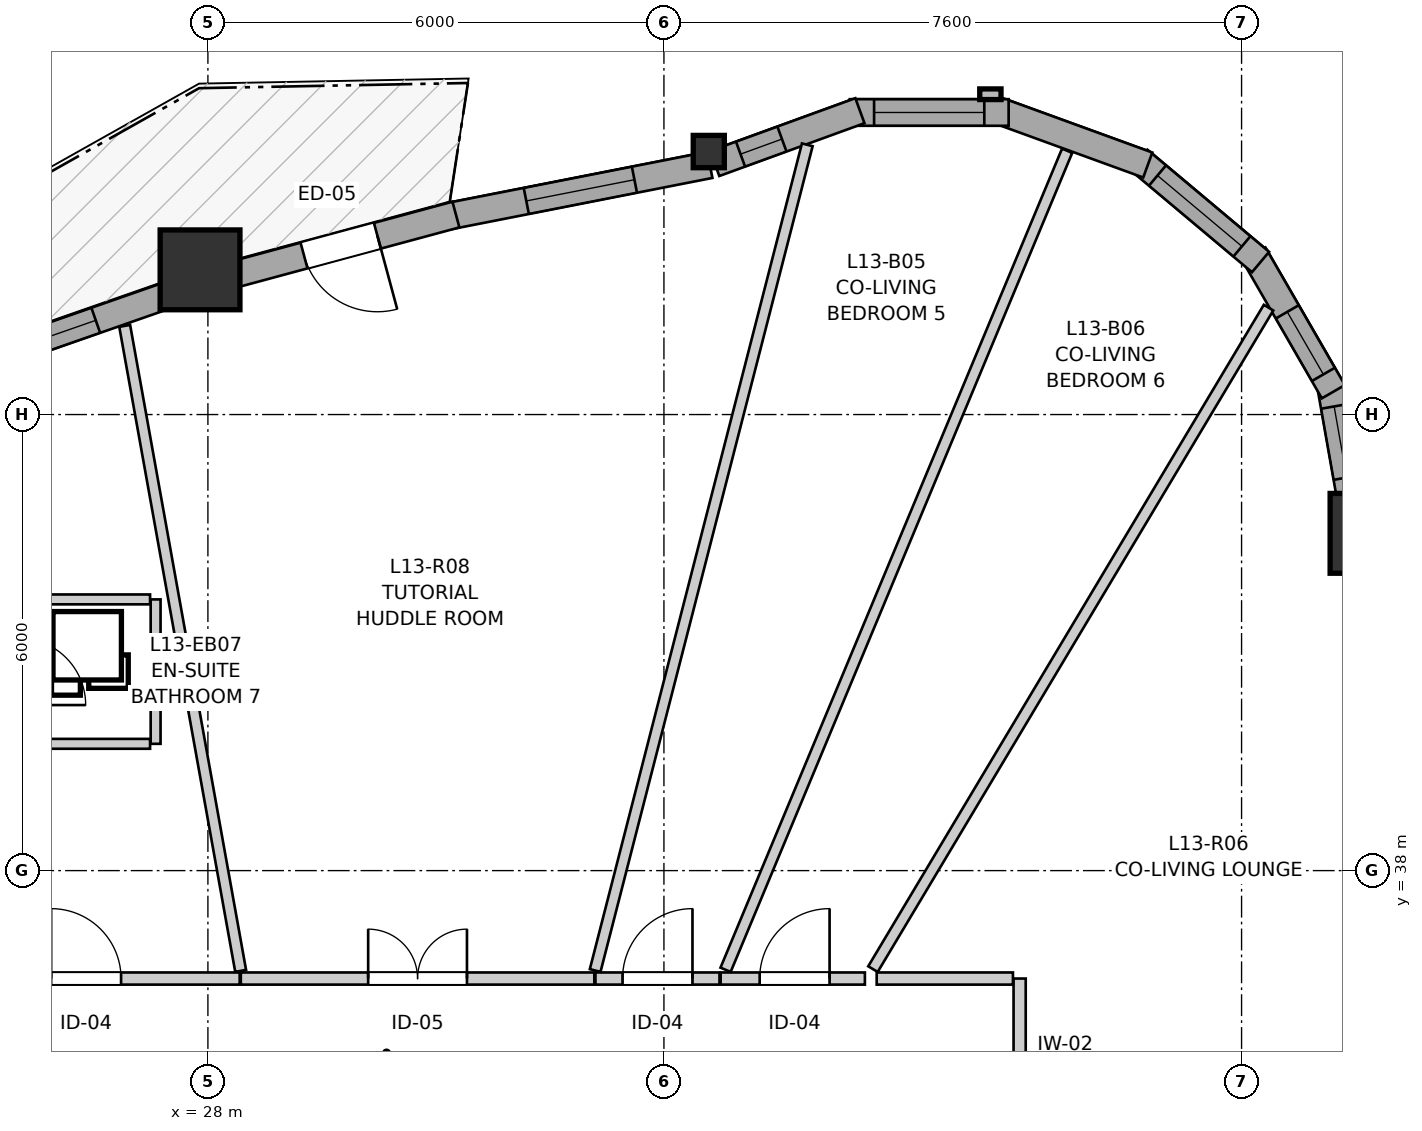
"""IFC4 building model, lengths in metres.
Left out: names, types, materials, properties, quantities, classifications, styles, units other than length and angle.
Written with IfcOpenShell. Run it as: python <this file> out.ifc"""

import sys

from ifc_helpers import new_model, si_unit, direction, frame, frame_2d, origin, origin_2d, place, context, subcontext, project, spatial, rectangle, i_section, extrude, source, transform, mapped, element, fill, save


model = new_model("IFC4")
c1 = context("Model", 3, precision=1e-05, world=origin(), true_north=direction((0.0, 1.0)))
c2 = subcontext(c1, "Body", "Model", "MODEL_VIEW")
j1 = project(units=[si_unit("LENGTHUNIT", "METRE"), si_unit("PLANEANGLEUNIT", "RADIAN")], contexts=[c1])
p1 = place(None, origin())
s1 = spatial("IfcSite", under=j1, at=p1, CompositionType="ELEMENT")
p2 = place(p1, origin())
s2 = spatial("IfcBuilding", under=s1, at=p2, CompositionType="ELEMENT")
p3 = place(p2, frame((0.0, 0.0, 46.2)))
s3 = spatial("IfcBuildingStorey", under=s2, at=p3, CompositionType="ELEMENT", Elevation=46.2)
m1 = source(origin(), c2, "Body", "SweptSolid", [
    extrude(rectangle(XDim=1.05, YDim=1.05, at=origin_2d()), origin(), (0.0, 0.0, 1.0), 2.94),
])
p4 = place(p3, frame((43.29, 42.437, 0.0), z_axis=(0.0, 0.0, 1.0), x_axis=(1.0, 0.0, 0.0)))
e1 = element("IfcColumn", 1, at=p4, inside=s3, PredefinedType="COLUMN", context=c2, shape_type="MappedRepresentation", body=[
    mapped(m1, transform((0.0, 0.0, 0.0), x_axis=(1.0, 0.0, 0.0), y_axis=(0.0, 1.0, 0.0), z_axis=(0.0, 0.0, 1.0), scale=1.0)),
])
m2 = source(origin(), c2, "Body", "SweptSolid", [
    extrude(i_section(OverallWidth=0.409, OverallDepth=0.425, WebThickness=0.03, FlangeThickness=0.048, FilletRadius=0.015, at=origin_2d()), origin(), (0.0, 0.0, 1.0), 2.94),
])
p5 = place(p3, frame((34.59, 47.46, 0.0), z_axis=(0.0, 0.0, 1.0), x_axis=(1.0, 0.0, 0.0)))
e2 = element("IfcColumn", 2, at=p5, inside=s3, PredefinedType="PILASTER", context=c2, shape_type="MappedRepresentation", body=[
    mapped(m2, transform((0.0, 0.0, 0.0), x_axis=(1.0, 0.0, 0.0), y_axis=(0.0, 1.0, 0.0), z_axis=(0.0, 0.0, 1.0), scale=1.0)),
])
p6 = place(p3, frame((27.896, 45.904, 0.0), z_axis=(0.0, 0.0, 1.0), x_axis=(1.0, 0.0, 0.0)))
e3 = element("IfcColumn", 3, at=p6, inside=s3, PredefinedType="COLUMN", context=c2, shape_type="MappedRepresentation", body=[
    mapped(m1, transform((0.0, 0.0, 0.0), x_axis=(1.0, 0.0, 0.0), y_axis=(0.0, 1.0, 0.0), z_axis=(0.0, 0.0, 1.0), scale=1.0)),
])
p7 = place(p3, frame((43.066, 42.702, 0.0), z_axis=(0.0, 0.0, 1.0), x_axis=(-0.173745591742, 0.984790571315, 0.0)))
e4 = element("IfcWall", 4, at=p7, inside=s3, PredefinedType="SOLIDWALL", context=c2, shape_type="SweptSolid", body=[
    extrude(rectangle(XDim=1.752, YDim=0.35, at=frame_2d((0.876, 0.0))), origin(), (0.0, 0.0, 1.0), 2.42),
])
p8 = place(p7, frame((0.476, 0.0, 0.82)))
e5 = element("IfcOpeningElement", 5, at=p8, cuts=e4, PredefinedType="OPENING", context=c2, shape_type="SweptSolid", body=[
    extrude(rectangle(XDim=0.95, YDim=1.35, at=frame_2d((0.475, 0.675))), frame((0.0, 0.185, 0.0), z_axis=(0.0, -1.0, 0.0), x_axis=(1.0, 0.0, 0.0)), (0.0, 0.0, 1.0), 0.37),
])
p9 = place(p3, frame((42.808, 44.301, 0.0), z_axis=(0.0, 0.0, 1.0), x_axis=(-0.500046000743, 0.865998843614, 0.0)))
e6 = element("IfcWall", 6, at=p9, inside=s3, PredefinedType="SOLIDWALL", context=c2, shape_type="SweptSolid", body=[
    extrude(rectangle(XDim=2.09, YDim=0.35, at=frame_2d((1.045, 0.0))), origin(), (0.0, 0.0, 1.0), 2.42),
])
p10 = place(p9, frame((0.263, 0.0, 0.82)))
e7 = element("IfcOpeningElement", 7, at=p10, cuts=e6, PredefinedType="OPENING", context=c2, shape_type="SweptSolid", body=[
    extrude(rectangle(XDim=0.95, YDim=1.35, at=frame_2d((0.475, 0.675))), frame((0.0, 0.185, 0.0), z_axis=(0.0, -1.0, 0.0), x_axis=(1.0, 0.0, 0.0)), (0.0, 0.0, 1.0), 0.37),
])
p11 = place(p3, frame((41.85, 46.007, 0.0), z_axis=(0.0, 0.0, 1.0), x_axis=(-0.766024572719, 0.642811289563, 0.0)))
e8 = element("IfcWall", 8, at=p11, inside=s3, PredefinedType="SOLIDWALL", context=c2, shape_type="SweptSolid", body=[
    extrude(rectangle(XDim=2.09, YDim=0.35, at=frame_2d((1.045, 0.0))), origin(), (0.0, 0.0, 1.0), 2.42),
])
p12 = place(p11, frame((0.32, 0.0, 0.82)))
e9 = element("IfcOpeningElement", 9, at=p12, cuts=e8, PredefinedType="OPENING", context=c2, shape_type="SweptSolid", body=[
    extrude(rectangle(XDim=1.45, YDim=1.25, at=frame_2d((0.725, 0.625))), frame((0.0, 0.185, 0.0), z_axis=(0.0, -1.0, 0.0), x_axis=(1.0, 0.0, 0.0)), (0.0, 0.0, 1.0), 0.37),
])
p13 = place(p3, frame((40.366, 47.283, 0.0), z_axis=(0.0, 0.0, 1.0), x_axis=(-0.939711556618, 0.341968113072, 0.0)))
e10 = element("IfcWall", 10, at=p13, inside=s3, PredefinedType="SOLIDWALL", context=c2, shape_type="SweptSolid", body=[
    extrude(rectangle(XDim=2.09, YDim=0.35, at=frame_2d((1.045, 0.0))), origin(), (0.0, 0.0, 1.0), 2.42),
])
p14 = place(p3, frame((38.535, 47.974, 0.0), z_axis=(0.0, 0.0, 1.0), x_axis=(-1.0, 0.0, 0.0)))
e11 = element("IfcWall", 11, at=p14, inside=s3, PredefinedType="SOLIDWALL", context=c2, shape_type="SweptSolid", body=[
    extrude(rectangle(XDim=2.09, YDim=0.35, at=frame_2d((1.045, 0.0))), origin(), (0.0, 0.0, 1.0), 2.42),
])
p15 = place(p14, frame((0.32, 0.0, 0.82)))
e12 = element("IfcOpeningElement", 12, at=p15, cuts=e11, PredefinedType="OPENING", context=c2, shape_type="SweptSolid", body=[
    extrude(rectangle(XDim=1.45, YDim=1.25, at=frame_2d((0.725, 0.625))), frame((0.0, 0.185, 0.0), z_axis=(0.0, -1.0, 0.0), x_axis=(1.0, 0.0, 0.0)), (0.0, 0.0, 1.0), 0.37),
])
p16 = place(p3, frame((36.578, 47.998, 0.0), z_axis=(0.0, 0.0, 1.0), x_axis=(-0.939691662178, -0.342022777067, 0.0)))
e13 = element("IfcWall", 13, at=p16, inside=s3, PredefinedType="SOLIDWALL", context=c2, shape_type="SweptSolid", body=[
    extrude(rectangle(XDim=2.032, YDim=0.35, at=frame_2d((1.016, 0.0))), origin(), (0.0, 0.0, 1.0), 2.42),
])
p17 = place(p16, frame((1.091, 0.0, 0.82)))
e14 = element("IfcOpeningElement", 14, at=p17, cuts=e13, PredefinedType="OPENING", context=c2, shape_type="SweptSolid", body=[
    extrude(rectangle(XDim=0.58, YDim=1.35, at=frame_2d((0.29, 0.675))), frame((0.0, 0.185, 0.0), z_axis=(0.0, -1.0, 0.0), x_axis=(1.0, 0.0, 0.0)), (0.0, 0.0, 1.0), 0.37),
])
p18 = place(p3, frame((34.604, 47.284, 0.0), z_axis=(0.0, 0.0, 1.0), x_axis=(-0.981236541068, -0.192807807086, 0.0)))
e15 = element("IfcWall", 15, at=p18, inside=s3, PredefinedType="SOLIDWALL", context=c2, shape_type="SweptSolid", body=[
    extrude(rectangle(XDim=3.492, YDim=0.35, at=frame_2d((1.746, 0.0))), origin(), (0.0, 0.0, 1.0), 2.42),
])
p19 = place(p18, frame((1.011, 0.0, 0.82)))
e16 = element("IfcOpeningElement", 16, at=p19, cuts=e15, PredefinedType="OPENING", context=c2, shape_type="SweptSolid", body=[
    extrude(rectangle(XDim=1.45, YDim=1.25, at=frame_2d((0.725, 0.625))), frame((0.0, 0.185, 0.0), z_axis=(0.0, -1.0, 0.0), x_axis=(1.0, 0.0, 0.0)), (0.0, 0.0, 1.0), 0.37),
])
p20 = place(p3, frame((31.263, 46.631, 0.0), z_axis=(0.0, 0.0, 1.0), x_axis=(-0.965460187066, -0.260550623086, 0.0)))
e17 = element("IfcWall", 17, at=p20, inside=s3, PredefinedType="SOLIDWALL", context=c2, shape_type="SweptSolid", body=[
    extrude(rectangle(XDim=3.14, YDim=0.35, at=frame_2d((1.57, 0.0))), origin(), (0.0, 0.0, 1.0), 2.42),
])
p21 = place(p20, frame((1.07, 0.0, 0.0)))
e18 = element("IfcOpeningElement", 18, at=p21, cuts=e17, PredefinedType="OPENING", context=c2, shape_type="SweptSolid", body=[
    extrude(rectangle(XDim=1.0, YDim=2.1, at=frame_2d((0.5, 1.05))), frame((0.0, 0.185, 0.0), z_axis=(0.0, -1.0, 0.0), x_axis=(1.0, 0.0, 0.0)), (0.0, 0.0, 1.0), 0.37),
])
p22 = place(p3, frame((27.671, 45.64, 0.0), z_axis=(0.0, 0.0, 1.0), x_axis=(-0.944140624307, -0.329542837175, 0.0)))
e19 = element("IfcWall", 19, at=p22, inside=s3, PredefinedType="SOLIDWALL", context=c2, shape_type="SweptSolid", body=[
    extrude(rectangle(XDim=3.084, YDim=0.35, at=frame_2d((1.542, 0.0))), origin(), (0.0, 0.0, 1.0), 2.42),
])
p23 = place(p22, frame((1.214, 0.0, 0.82)))
e20 = element("IfcOpeningElement", 20, at=p23, cuts=e19, PredefinedType="OPENING", context=c2, shape_type="SweptSolid", body=[
    extrude(rectangle(XDim=1.45, YDim=1.25, at=frame_2d((0.725, 0.625))), frame((0.0, 0.185, 0.0), z_axis=(0.0, -1.0, 0.0), x_axis=(1.0, 0.0, 0.0)), (0.0, 0.0, 1.0), 0.37),
])
p24 = place(p3, frame((38.68, 36.58, 0.0), z_axis=(0.0, 0.0, 1.0), x_axis=(0.0, -1.0, 0.0)))
e21 = element("IfcWall", 21, at=p24, inside=s3, PredefinedType="PARTITIONING", context=c2, shape_type="SweptSolid", body=[
    extrude(rectangle(XDim=5.88, YDim=0.16, at=frame_2d((2.94, 0.0))), origin(), (0.0, 0.0, 1.0), 2.94),
])
p25 = place(p24, frame((2.281, 0.0, 0.0)))
e22 = element("IfcOpeningElement", 22, at=p25, cuts=e21, PredefinedType="OPENING", context=c2, shape_type="SweptSolid", body=[
    extrude(rectangle(XDim=1.3, YDim=2.1, at=frame_2d((0.65, 1.05))), frame((0.0, 0.09, 0.0), z_axis=(0.0, -1.0, 0.0), x_axis=(1.0, 0.0, 0.0)), (0.0, 0.0, 1.0), 0.18),
])
p26 = place(p3, frame((28.433, 36.58, 0.0), z_axis=(0.0, 0.0, 1.0), x_axis=(1.0, 0.0, 0.0)))
e23 = element("IfcWall", 23, at=p26, inside=s3, PredefinedType="PARTITIONING", context=c2, shape_type="SweptSolid", body=[
    extrude(rectangle(XDim=4.651, YDim=0.16, at=frame_2d((2.325, 0.0))), origin(), (0.0, 0.0, 1.0), 2.94),
])
p27 = place(p26, frame((1.676, 0.0, 0.0)))
e24 = element("IfcOpeningElement", 24, at=p27, cuts=e23, PredefinedType="OPENING", context=c2, shape_type="SweptSolid", body=[
    extrude(rectangle(XDim=1.3, YDim=2.1, at=frame_2d((0.65, 1.05))), frame((0.0, 0.09, 0.0), z_axis=(0.0, -1.0, 0.0), x_axis=(1.0, 0.0, 0.0)), (0.0, 0.0, 1.0), 0.18),
])
p28 = place(p3, frame((24.329, 36.58, 0.0), z_axis=(0.0, 0.0, 1.0), x_axis=(1.0, 0.0, 0.0)))
e25 = element("IfcWall", 25, at=p28, inside=s3, PredefinedType="PARTITIONING", context=c2, shape_type="SweptSolid", body=[
    extrude(rectangle(XDim=4.089, YDim=0.16, at=frame_2d((2.044, 0.0))), origin(), (0.0, 0.0, 1.0), 2.548),
])
p29 = place(p28, frame((1.608, 0.0, 0.0)))
e26 = element("IfcOpeningElement", 26, at=p29, cuts=e25, PredefinedType="OPENING", context=c2, shape_type="SweptSolid", body=[
    extrude(rectangle(XDim=0.92, YDim=2.1, at=frame_2d((0.46, 1.05))), frame((0.0, 0.09, 0.0), z_axis=(0.0, -1.0, 0.0), x_axis=(1.0, 0.0, 0.0)), (0.0, 0.0, 1.0), 0.18),
])
p30 = place(p3, frame((34.746, 36.58, 0.0), z_axis=(0.0, 0.0, 1.0), x_axis=(1.0, 0.0, 0.0)))
e27 = element("IfcWall", 27, at=p30, inside=s3, PredefinedType="PARTITIONING", context=c2, shape_type="SweptSolid", body=[
    extrude(rectangle(XDim=1.898, YDim=0.16, at=frame_2d((0.949, 0.0))), origin(), (0.0, 0.0, 1.0), 2.94),
])
p31 = place(p30, frame((0.513, 0.0, 0.0)))
e28 = element("IfcOpeningElement", 28, at=p31, cuts=e27, PredefinedType="OPENING", context=c2, shape_type="SweptSolid", body=[
    extrude(rectangle(XDim=0.92, YDim=2.1, at=frame_2d((0.46, 1.05))), frame((0.0, 0.09, 0.0), z_axis=(0.0, -1.0, 0.0), x_axis=(1.0, 0.0, 0.0)), (0.0, 0.0, 1.0), 0.18),
])
p32 = place(p3, frame((33.099, 36.58, 0.0), z_axis=(0.0, 0.0, 1.0), x_axis=(1.0, 0.0, 0.0)))
e29 = element("IfcWall", 29, at=p32, inside=s3, PredefinedType="PARTITIONING", context=c2, shape_type="SweptSolid", body=[
    extrude(rectangle(XDim=1.632, YDim=0.16, at=frame_2d((0.816, 0.0))), origin(), (0.0, 0.0, 1.0), 2.94),
])
p33 = place(p32, frame((0.356, 0.0, 0.0)))
e30 = element("IfcOpeningElement", 30, at=p33, cuts=e29, PredefinedType="OPENING", context=c2, shape_type="SweptSolid", body=[
    extrude(rectangle(XDim=0.92, YDim=2.1, at=frame_2d((0.46, 1.05))), frame((0.0, 0.09, 0.0), z_axis=(0.0, -1.0, 0.0), x_axis=(1.0, 0.0, 0.0)), (0.0, 0.0, 1.0), 0.18),
])
p34 = place(p3, frame((34.811, 36.695, 0.0), z_axis=(0.0, 0.0, 1.0), x_axis=(0.384925700713, 0.922947563479, 0.0)))
e31 = element("IfcWall", 31, at=p34, inside=s3, PredefinedType="PARTITIONING", context=c2, shape_type="SweptSolid", body=[
    extrude(rectangle(XDim=11.675, YDim=0.145, at=frame_2d((5.837, 0.0))), origin(), (0.0, 0.0, 1.0), 2.94),
])
p35 = place(p3, frame((33.095, 36.686, 0.0), z_axis=(0.0, 0.0, 1.0), x_axis=(0.24882519125, 0.96854841087, 0.0)))
e32 = element("IfcWall", 32, at=p35, inside=s3, PredefinedType="PARTITIONING", context=c2, shape_type="SweptSolid", body=[
    extrude(rectangle(XDim=11.216, YDim=0.145, at=frame_2d((5.608, 0.0))), origin(), (0.0, 0.0, 1.0), 2.94),
])
p36 = place(p3, frame((36.75, 36.704, 0.0), z_axis=(0.0, 0.0, 1.0), x_axis=(0.51326307339, 0.858231330991, 0.0)))
e33 = element("IfcWall", 33, at=p36, inside=s3, PredefinedType="PARTITIONING", context=c2, shape_type="SweptSolid", body=[
    extrude(rectangle(XDim=10.14, YDim=0.145, at=frame_2d((5.07, 0.0))), origin(), (0.0, 0.0, 1.0), 2.94),
])
p37 = place(p3, frame((26.905, 45.167, 0.0), z_axis=(0.0, 0.0, 1.0), x_axis=(0.176948932403, -0.984220033997, 0.0)))
e34 = element("IfcWall", 34, at=p37, inside=s3, PredefinedType="PARTITIONING", context=c2, shape_type="SweptSolid", body=[
    extrude(rectangle(XDim=8.622, YDim=0.145, at=frame_2d((4.311, 0.0))), origin(), (0.0, 0.0, 1.0), 2.94),
])
p38 = place(p3, frame((36.799, 36.58, 0.0), z_axis=(0.0, 0.0, 1.0), x_axis=(1.0, 0.0, 0.0)))
e35 = element("IfcWall", 35, at=p38, inside=s3, PredefinedType="PARTITIONING", context=c2, shape_type="SweptSolid", body=[
    extrude(rectangle(XDim=1.793, YDim=0.16, at=frame_2d((0.896, 0.0))), origin(), (0.0, 0.0, 1.0), 2.94),
])
p39 = place(p3, frame((27.312, 39.668, 0.0), z_axis=(0.0, 0.0, 1.0), x_axis=(0.0, 1.0, 0.0)))
e36 = element("IfcWall", 36, at=p39, inside=s3, PredefinedType="PARTITIONING", context=c2, shape_type="SweptSolid", body=[
    extrude(rectangle(XDim=1.9, YDim=0.13, at=frame_2d((0.95, 0.0))), origin(), (0.0, 0.0, 1.0), 2.94),
])
p40 = place(p3, frame((25.585, 41.568, 0.0), z_axis=(0.0, 0.0, 1.0), x_axis=(1.0, 0.0, 0.0)))
e37 = element("IfcWall", 37, at=p40, inside=s3, PredefinedType="PARTITIONING", context=c2, shape_type="SweptSolid", body=[
    extrude(rectangle(XDim=1.654, YDim=0.13, at=frame_2d((0.827, 0.0))), origin(), (0.0, 0.0, 1.0), 2.508),
])
p41 = place(p3, frame((25.585, 39.668, 0.0), z_axis=(0.0, 0.0, 1.0), x_axis=(1.0, 0.0, 0.0)))
e38 = element("IfcWall", 38, at=p41, inside=s3, PredefinedType="PARTITIONING", context=c2, shape_type="SweptSolid", body=[
    extrude(rectangle(XDim=1.654, YDim=0.13, at=frame_2d((0.827, 0.0))), origin(), (0.0, 0.0, 1.0), 2.94),
])
m3 = source(origin(), c2, "Body", "SweptSolid", [
    extrude(rectangle(XDim=0.95, YDim=1.35, at=frame_2d((0.475, 0.675))), frame((0.0, 0.03, 0.0), z_axis=(0.0, -1.0, 0.0), x_axis=(1.0, 0.0, 0.0)), (0.0, 0.0, 1.0), 0.06),
])
p42 = place(p8, origin())
e39 = element("IfcWindow", 39, at=p42, inside=s3, PartitioningType="SINGLE_PANEL", PredefinedType="WINDOW", context=c2, shape_type="MappedRepresentation", body=[
    mapped(m3, transform((0.0, 0.0, 0.0), x_axis=(1.0, 0.0, 0.0), y_axis=(0.0, 1.0, 0.0), z_axis=(0.0, 0.0, 1.0), scale=1.0)),
])
fill(e5, e39)
p43 = place(p10, origin())
e40 = element("IfcWindow", 40, at=p43, inside=s3, PartitioningType="SINGLE_PANEL", PredefinedType="WINDOW", context=c2, shape_type="MappedRepresentation", body=[
    mapped(m3, transform((0.0, 0.0, 0.0), x_axis=(1.0, 0.0, 0.0), y_axis=(0.0, 1.0, 0.0), z_axis=(0.0, 0.0, 1.0), scale=1.0)),
])
fill(e7, e40)
m4 = source(origin(), c2, "Body", "SweptSolid", [
    extrude(rectangle(XDim=1.45, YDim=1.25, at=frame_2d((0.725, 0.625))), frame((0.0, 0.03, 0.0), z_axis=(0.0, -1.0, 0.0), x_axis=(1.0, 0.0, 0.0)), (0.0, 0.0, 1.0), 0.06),
])
p44 = place(p12, origin())
e41 = element("IfcWindow", 41, at=p44, inside=s3, PartitioningType="SINGLE_PANEL", PredefinedType="WINDOW", context=c2, shape_type="MappedRepresentation", body=[
    mapped(m4, transform((0.0, 0.0, 0.0), x_axis=(1.0, 0.0, 0.0), y_axis=(0.0, 1.0, 0.0), z_axis=(0.0, 0.0, 1.0), scale=1.0)),
])
fill(e9, e41)
p45 = place(p15, origin())
e42 = element("IfcWindow", 42, at=p45, inside=s3, PartitioningType="SINGLE_PANEL", PredefinedType="WINDOW", context=c2, shape_type="MappedRepresentation", body=[
    mapped(m4, transform((0.0, 0.0, 0.0), x_axis=(1.0, 0.0, 0.0), y_axis=(0.0, 1.0, 0.0), z_axis=(0.0, 0.0, 1.0), scale=1.0)),
])
fill(e12, e42)
m5 = source(origin(), c2, "Body", "SweptSolid", [
    extrude(rectangle(XDim=0.58, YDim=1.35, at=frame_2d((0.29, 0.675))), frame((0.0, 0.03, 0.0), z_axis=(0.0, -1.0, 0.0), x_axis=(1.0, 0.0, 0.0)), (0.0, 0.0, 1.0), 0.06),
])
p46 = place(p17, origin())
e43 = element("IfcWindow", 43, at=p46, inside=s3, PartitioningType="SINGLE_PANEL", PredefinedType="WINDOW", context=c2, shape_type="MappedRepresentation", body=[
    mapped(m5, transform((0.0, 0.0, 0.0), x_axis=(1.0, 0.0, 0.0), y_axis=(0.0, 1.0, 0.0), z_axis=(0.0, 0.0, 1.0), scale=1.0)),
])
fill(e14, e43)
p47 = place(p19, origin())
e44 = element("IfcWindow", 44, at=p47, inside=s3, PartitioningType="SINGLE_PANEL", PredefinedType="WINDOW", context=c2, shape_type="MappedRepresentation", body=[
    mapped(m4, transform((0.0, 0.0, 0.0), x_axis=(1.0, 0.0, 0.0), y_axis=(0.0, 1.0, 0.0), z_axis=(0.0, 0.0, 1.0), scale=1.0)),
])
fill(e16, e44)
p48 = place(p23, origin())
e45 = element("IfcWindow", 45, at=p48, inside=s3, PartitioningType="SINGLE_PANEL", PredefinedType="WINDOW", context=c2, shape_type="MappedRepresentation", body=[
    mapped(m4, transform((0.0, 0.0, 0.0), x_axis=(1.0, 0.0, 0.0), y_axis=(0.0, 1.0, 0.0), z_axis=(0.0, 0.0, 1.0), scale=1.0)),
])
fill(e20, e45)
m6 = source(origin(), c2, "Body", "SweptSolid", [
    extrude(rectangle(XDim=1.0, YDim=2.1, at=frame_2d((0.5, 1.05))), frame((0.0, 0.025, 0.0), z_axis=(0.0, -1.0, 0.0), x_axis=(1.0, 0.0, 0.0)), (0.0, 0.0, 1.0), 0.05),
])
p49 = place(p21, origin())
e46 = element("IfcDoor", 46, at=p49, inside=s3, OperationType="SINGLE_SWING_LEFT", PredefinedType="DOOR", context=c2, shape_type="MappedRepresentation", body=[
    mapped(m6, transform((0.0, 0.0, 0.0), x_axis=(1.0, 0.0, 0.0), y_axis=(0.0, 1.0, 0.0), z_axis=(0.0, 0.0, 1.0), scale=1.0)),
])
fill(e18, e46)
m7 = source(origin(), c2, "Body", "SweptSolid", [
    extrude(rectangle(XDim=1.3, YDim=2.1, at=frame_2d((0.65, 1.05))), frame((0.0, 0.025, 0.0), z_axis=(0.0, -1.0, 0.0), x_axis=(1.0, 0.0, 0.0)), (0.0, 0.0, 1.0), 0.05),
])
p50 = place(p27, origin())
e47 = element("IfcDoor", 47, at=p50, inside=s3, OperationType="DOUBLE_DOOR_SINGLE_SWING", PredefinedType="DOOR", context=c2, shape_type="MappedRepresentation", body=[
    mapped(m7, transform((0.0, 0.0, 0.0), x_axis=(1.0, 0.0, 0.0), y_axis=(0.0, 1.0, 0.0), z_axis=(0.0, 0.0, 1.0), scale=1.0)),
])
fill(e24, e47)
m8 = source(origin(), c2, "Body", "SweptSolid", [
    extrude(rectangle(XDim=0.92, YDim=2.1, at=frame_2d((0.46, 1.05))), frame((0.0, 0.025, 0.0), z_axis=(0.0, -1.0, 0.0), x_axis=(1.0, 0.0, 0.0)), (0.0, 0.0, 1.0), 0.05),
])
p51 = place(p29, origin())
e48 = element("IfcDoor", 48, at=p51, inside=s3, OperationType="SINGLE_SWING_LEFT", PredefinedType="DOOR", context=c2, shape_type="MappedRepresentation", body=[
    mapped(m8, transform((0.0, 0.0, 0.0), x_axis=(1.0, 0.0, 0.0), y_axis=(0.0, 1.0, 0.0), z_axis=(0.0, 0.0, 1.0), scale=1.0)),
])
fill(e26, e48)
p52 = place(p31, origin())
e49 = element("IfcDoor", 49, at=p52, inside=s3, OperationType="SINGLE_SWING_RIGHT", PredefinedType="DOOR", context=c2, shape_type="MappedRepresentation", body=[
    mapped(m8, transform((0.0, 0.0, 0.0), x_axis=(1.0, 0.0, 0.0), y_axis=(0.0, 1.0, 0.0), z_axis=(0.0, 0.0, 1.0), scale=1.0)),
])
fill(e28, e49)
p53 = place(p33, origin())
e50 = element("IfcDoor", 50, at=p53, inside=s3, OperationType="SINGLE_SWING_RIGHT", PredefinedType="DOOR", context=c2, shape_type="MappedRepresentation", body=[
    mapped(m8, transform((0.0, 0.0, 0.0), x_axis=(1.0, 0.0, 0.0), y_axis=(0.0, 1.0, 0.0), z_axis=(0.0, 0.0, 1.0), scale=1.0)),
])
fill(e30, e50)
save(model, sys.argv[1])
